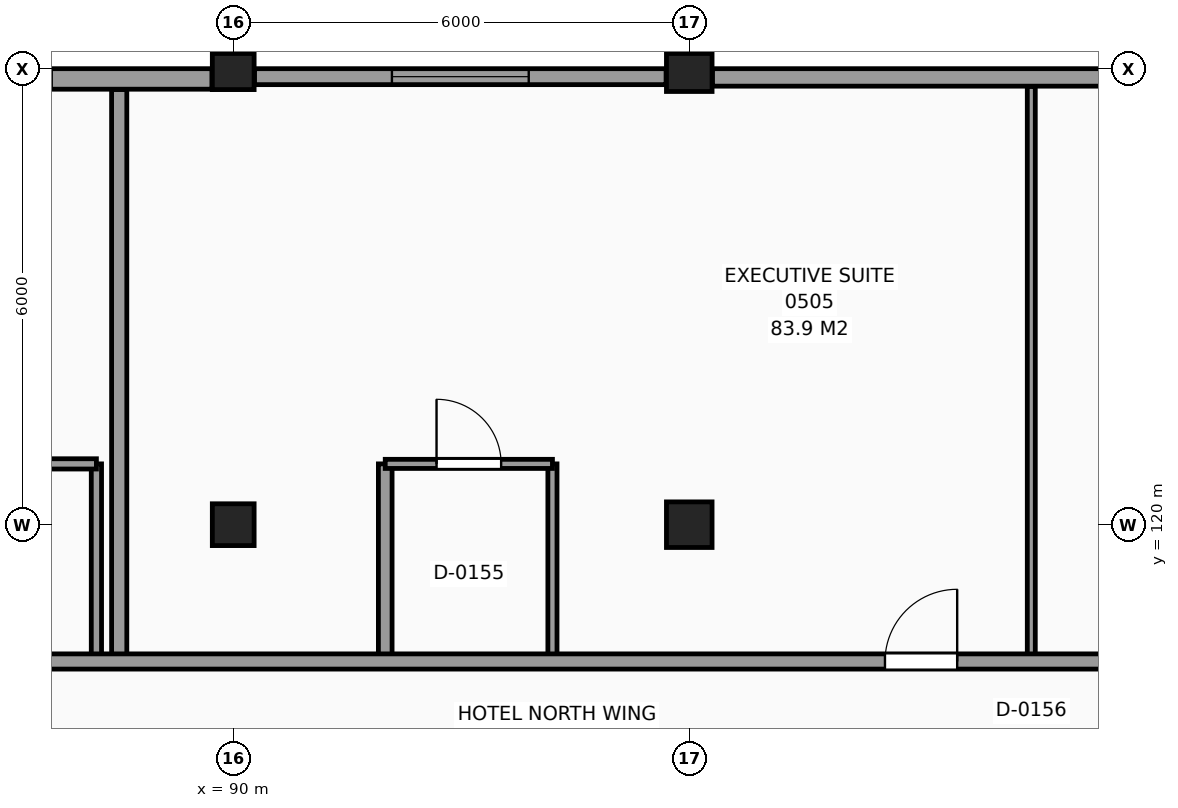
"""IFC4 building model, lengths in metres.
Left out: names, types, materials, properties, quantities, classifications, styles, units other than length and angle.
Written with IfcOpenShell. Run it as: python <this file> out.ifc"""

import sys

from ifc_helpers import new_model, si_unit, direction, frame, frame_2d, origin, origin_2d, place, context, subcontext, project, spatial, rectangle, extrude, element, fill, save


model = new_model("IFC4")
c1 = context("Model", 3, precision=1e-05, world=origin(), true_north=direction((0.0, 1.0)))
c2 = subcontext(c1, "Body", "Model", "MODEL_VIEW")
j1 = project(units=[si_unit("LENGTHUNIT", "METRE"), si_unit("PLANEANGLEUNIT", "RADIAN")], contexts=[c1])
p1 = place(None, origin())
s1 = spatial("IfcSite", under=j1, at=p1, CompositionType="ELEMENT")
p2 = place(p1, origin())
s2 = spatial("IfcBuilding", under=s1, at=p2, CompositionType="ELEMENT")
p3 = place(p2, frame((0.0, 0.0, 24.6)))
s3 = spatial("IfcBuildingStorey", under=s2, at=p3, CompositionType="ELEMENT", Elevation=24.6)
for number, where, z_axis, x_axis in (
    (1, (90.0, 120.0, 0.0), (0.0, 0.0, 1.0), (1.0, 0.0, 0.0)),
    (2, (90.0, 126.0, 0.0), (0.0, 0.0, 1.0), (1.0, 0.0, 0.0)),
):
    element("IfcColumn", number, at=place(p3, frame(where, z_axis=z_axis, x_axis=x_axis)), inside=s3, PredefinedType="COLUMN", context=c2, shape_type="SweptSolid", body=[
        extrude(rectangle(XDim=0.55, YDim=0.55, at=origin_2d()), origin(), (0.0, 0.0, 1.0), 3.6),
    ])
for number, where, z_axis, x_axis in (
    (3, (96.0, 120.0, 0.0), (0.0, 0.0, 1.0), (1.0, 0.0, 0.0)),
    (4, (96.0, 126.0, 0.0), (0.0, 0.0, 1.0), (1.0, 0.0, 0.0)),
):
    element("IfcColumn", number, at=place(p3, frame(where, z_axis=z_axis, x_axis=x_axis)), inside=s3, PredefinedType="COLUMN", context=c2, shape_type="SweptSolid", body=[
        extrude(rectangle(XDim=0.6, YDim=0.6, at=origin_2d()), origin(), (0.0, 0.0, 1.0), 3.6),
    ])
p4 = place(p3, frame((101.72, 125.885, 0.0), z_axis=(0.0, 0.0, 1.0), x_axis=(-1.0, 0.0, 0.0)))
e5 = element("IfcWall", 5, at=p4, inside=s3, PredefinedType="SOLIDWALL", context=c2, shape_type="SweptSolid", body=[
    extrude(rectangle(XDim=5.415, YDim=0.23, at=frame_2d((2.708, 0.0))), origin(), (0.0, 0.0, 1.0), 2.73),
])
p5 = place(p3, frame((95.695, 125.895, 0.0), z_axis=(0.0, 0.0, 1.0), x_axis=(-1.0, 0.0, 0.0)))
e6 = element("IfcWall", 6, at=p5, inside=s3, PredefinedType="SOLIDWALL", context=c2, shape_type="SweptSolid", body=[
    extrude(rectangle(XDim=5.415, YDim=0.21, at=frame_2d((2.708, 0.0))), origin(), (0.0, 0.0, 1.0), 2.73),
])
p6 = place(p5, frame((1.807, 0.0, 0.8)))
e7 = element("IfcOpeningElement", 7, at=p6, cuts=e6, PredefinedType="OPENING", context=c2, shape_type="SweptSolid", body=[
    extrude(rectangle(XDim=1.8, YDim=1.7, at=frame_2d((0.9, 0.85))), frame((0.0, 0.115, 0.0), z_axis=(0.0, -1.0, 0.0), x_axis=(1.0, 0.0, 0.0)), (0.0, 0.0, 1.0), 0.23),
])
p7 = place(p3, frame((89.72, 125.865, 0.0), z_axis=(0.0, 0.0, 1.0), x_axis=(-1.0, 0.0, 0.0)))
e8 = element("IfcWall", 8, at=p7, inside=s3, PredefinedType="SOLIDWALL", context=c2, shape_type="SweptSolid", body=[
    extrude(rectangle(XDim=5.415, YDim=0.27, at=frame_2d((2.708, 0.0))), origin(), (0.0, 0.0, 1.0), 2.73),
])
p8 = place(p7, frame((2.108, 0.0, 0.8)))
e9 = element("IfcOpeningElement", 9, at=p8, cuts=e8, PredefinedType="OPENING", context=c2, shape_type="SweptSolid", body=[
    extrude(rectangle(XDim=2.4, YDim=1.75, at=frame_2d((1.2, 0.875))), frame((0.0, 0.145, 0.0), z_axis=(0.0, -1.0, 0.0), x_axis=(1.0, 0.0, 0.0)), (0.0, 0.0, 1.0), 0.29),
])
p9 = place(p3, frame((88.2, 118.2, 0.0), z_axis=(0.0, 0.0, 1.0), x_axis=(0.0, 1.0, 0.0)))
e10 = element("IfcWall", 10, at=p9, inside=s3, PredefinedType="PARTITIONING", context=c2, shape_type="SweptSolid", body=[
    extrude(rectangle(XDim=2.6, YDim=0.135, at=frame_2d((1.3, 0.0))), origin(), (0.0, 0.0, 1.0), 3.38),
])
p10 = place(p3, frame((88.5, 118.2, 0.0), z_axis=(0.0, 0.0, 1.0), x_axis=(0.0, 1.0, 0.0)))
e11 = element("IfcWall", 11, at=p10, inside=s3, PredefinedType="PARTITIONING", context=c2, shape_type="SweptSolid", body=[
    extrude(rectangle(XDim=7.525, YDim=0.2, at=frame_2d((3.763, 0.0))), origin(), (0.0, 0.0, 1.0), 3.38),
])
p11 = place(p3, frame((92.0, 118.2, 0.0), z_axis=(0.0, 0.0, 1.0), x_axis=(0.0, 1.0, 0.0)))
e12 = element("IfcWall", 12, at=p11, inside=s3, PredefinedType="PARTITIONING", context=c2, shape_type="SweptSolid", body=[
    extrude(rectangle(XDim=2.6, YDim=0.18, at=frame_2d((1.3, 0.0))), origin(), (0.0, 0.0, 1.0), 3.38),
])
p12 = place(p3, frame((94.2, 118.2, 0.0), z_axis=(0.0, 0.0, 1.0), x_axis=(0.0, 1.0, 0.0)))
e13 = element("IfcWall", 13, at=p12, inside=s3, PredefinedType="PARTITIONING", context=c2, shape_type="SweptSolid", body=[
    extrude(rectangle(XDim=2.6, YDim=0.12, at=frame_2d((1.3, 0.0))), origin(), (0.0, 0.0, 1.0), 3.38),
])
p13 = place(p3, frame((100.5, 118.2, 0.0), z_axis=(0.0, 0.0, 1.0), x_axis=(0.0, 1.0, 0.0)))
e14 = element("IfcWall", 14, at=p13, inside=s3, PredefinedType="PARTITIONING", context=c2, shape_type="SweptSolid", body=[
    extrude(rectangle(XDim=7.565, YDim=0.105, at=frame_2d((3.782, 0.0))), origin(), (0.0, 0.0, 1.0), 3.38),
])
p14 = place(p3, frame((66.255, 118.2, 0.0), z_axis=(0.0, 0.0, 1.0), x_axis=(1.0, 0.0, 0.0)))
e15 = element("IfcWall", 15, at=p14, inside=s3, PredefinedType="PARTITIONING", context=c2, shape_type="SweptSolid", body=[
    extrude(rectangle(XDim=110.245, YDim=0.2, at=frame_2d((55.123, 0.0))), origin(), (0.0, 0.0, 1.0), 3.38),
])
p15 = place(p14, frame((7.57, 0.0, 0.0)))
e16 = element("IfcOpeningElement", 16, at=p15, cuts=e15, PredefinedType="OPENING", context=c2, shape_type="SweptSolid", body=[
    extrude(rectangle(XDim=0.95, YDim=2.1, at=frame_2d((0.475, 1.05))), frame((0.0, 0.11, 0.0), z_axis=(0.0, -1.0, 0.0), x_axis=(1.0, 0.0, 0.0)), (0.0, 0.0, 1.0), 0.22),
])
p16 = place(p14, frame((12.07, 0.0, 0.0)))
e17 = element("IfcOpeningElement", 17, at=p16, cuts=e15, PredefinedType="OPENING", context=c2, shape_type="SweptSolid", body=[
    extrude(rectangle(XDim=0.95, YDim=2.1, at=frame_2d((0.475, 1.05))), frame((0.0, 0.11, 0.0), z_axis=(0.0, -1.0, 0.0), x_axis=(1.0, 0.0, 0.0)), (0.0, 0.0, 1.0), 0.22),
])
p17 = place(p14, frame((16.27, 0.0, 0.0)))
e18 = element("IfcOpeningElement", 18, at=p17, cuts=e15, PredefinedType="OPENING", context=c2, shape_type="SweptSolid", body=[
    extrude(rectangle(XDim=0.95, YDim=2.1, at=frame_2d((0.475, 1.05))), frame((0.0, 0.11, 0.0), z_axis=(0.0, -1.0, 0.0), x_axis=(1.0, 0.0, 0.0)), (0.0, 0.0, 1.0), 0.22),
])
p18 = place(p14, frame((18.47, 0.0, 0.0)))
e19 = element("IfcOpeningElement", 19, at=p18, cuts=e15, PredefinedType="OPENING", context=c2, shape_type="SweptSolid", body=[
    extrude(rectangle(XDim=0.95, YDim=2.1, at=frame_2d((0.475, 1.05))), frame((0.0, 0.11, 0.0), z_axis=(0.0, -1.0, 0.0), x_axis=(1.0, 0.0, 0.0)), (0.0, 0.0, 1.0), 0.22),
])
p19 = place(p14, frame((32.32, 0.0, 0.0)))
e20 = element("IfcOpeningElement", 20, at=p19, cuts=e15, PredefinedType="OPENING", context=c2, shape_type="SweptSolid", body=[
    extrude(rectangle(XDim=0.95, YDim=2.1, at=frame_2d((0.475, 1.05))), frame((0.0, 0.11, 0.0), z_axis=(0.0, -1.0, 0.0), x_axis=(1.0, 0.0, 0.0)), (0.0, 0.0, 1.0), 0.22),
])
p20 = place(p14, frame((36.47, 0.0, 0.0)))
e21 = element("IfcOpeningElement", 21, at=p20, cuts=e15, PredefinedType="OPENING", context=c2, shape_type="SweptSolid", body=[
    extrude(rectangle(XDim=0.95, YDim=2.1, at=frame_2d((0.475, 1.05))), frame((0.0, 0.11, 0.0), z_axis=(0.0, -1.0, 0.0), x_axis=(1.0, 0.0, 0.0)), (0.0, 0.0, 1.0), 0.22),
])
p21 = place(p14, frame((46.27, 0.0, 0.0)))
e22 = element("IfcOpeningElement", 22, at=p21, cuts=e15, PredefinedType="OPENING", context=c2, shape_type="SweptSolid", body=[
    extrude(rectangle(XDim=0.95, YDim=2.1, at=frame_2d((0.475, 1.05))), frame((0.0, 0.11, 0.0), z_axis=(0.0, -1.0, 0.0), x_axis=(1.0, 0.0, 0.0)), (0.0, 0.0, 1.0), 0.22),
])
p22 = place(p14, frame((48.47, 0.0, 0.0)))
e23 = element("IfcOpeningElement", 23, at=p22, cuts=e15, PredefinedType="OPENING", context=c2, shape_type="SweptSolid", body=[
    extrude(rectangle(XDim=0.95, YDim=2.1, at=frame_2d((0.475, 1.05))), frame((0.0, 0.11, 0.0), z_axis=(0.0, -1.0, 0.0), x_axis=(1.0, 0.0, 0.0)), (0.0, 0.0, 1.0), 0.22),
])
p23 = place(p14, frame((52.87, 0.0, 0.0)))
e24 = element("IfcOpeningElement", 24, at=p23, cuts=e15, PredefinedType="OPENING", context=c2, shape_type="SweptSolid", body=[
    extrude(rectangle(XDim=0.95, YDim=2.1, at=frame_2d((0.475, 1.05))), frame((0.0, 0.11, 0.0), z_axis=(0.0, -1.0, 0.0), x_axis=(1.0, 0.0, 0.0)), (0.0, 0.0, 1.0), 0.22),
])
p24 = place(p14, frame((60.07, 0.0, 0.0)))
e25 = element("IfcOpeningElement", 25, at=p24, cuts=e15, PredefinedType="OPENING", context=c2, shape_type="SweptSolid", body=[
    extrude(rectangle(XDim=0.95, YDim=2.1, at=frame_2d((0.475, 1.05))), frame((0.0, 0.11, 0.0), z_axis=(0.0, -1.0, 0.0), x_axis=(1.0, 0.0, 0.0)), (0.0, 0.0, 1.0), 0.22),
])
p25 = place(p14, frame((68.32, 0.0, 0.0)))
e26 = element("IfcOpeningElement", 26, at=p25, cuts=e15, PredefinedType="OPENING", context=c2, shape_type="SweptSolid", body=[
    extrude(rectangle(XDim=0.95, YDim=2.1, at=frame_2d((0.475, 1.05))), frame((0.0, 0.11, 0.0), z_axis=(0.0, -1.0, 0.0), x_axis=(1.0, 0.0, 0.0)), (0.0, 0.0, 1.0), 0.22),
])
p26 = place(p14, frame((80.32, 0.0, 0.0)))
e27 = element("IfcOpeningElement", 27, at=p26, cuts=e15, PredefinedType="OPENING", context=c2, shape_type="SweptSolid", body=[
    extrude(rectangle(XDim=0.95, YDim=2.1, at=frame_2d((0.475, 1.05))), frame((0.0, 0.11, 0.0), z_axis=(0.0, -1.0, 0.0), x_axis=(1.0, 0.0, 0.0)), (0.0, 0.0, 1.0), 0.22),
])
p27 = place(p14, frame((82.87, 0.0, 0.0)))
e28 = element("IfcOpeningElement", 28, at=p27, cuts=e15, PredefinedType="OPENING", context=c2, shape_type="SweptSolid", body=[
    extrude(rectangle(XDim=0.95, YDim=2.1, at=frame_2d((0.475, 1.05))), frame((0.0, 0.11, 0.0), z_axis=(0.0, -1.0, 0.0), x_axis=(1.0, 0.0, 0.0)), (0.0, 0.0, 1.0), 0.22),
])
p28 = place(p14, frame((90.07, 0.0, 0.0)))
e29 = element("IfcOpeningElement", 29, at=p28, cuts=e15, PredefinedType="OPENING", context=c2, shape_type="SweptSolid", body=[
    extrude(rectangle(XDim=0.95, YDim=2.1, at=frame_2d((0.475, 1.05))), frame((0.0, 0.11, 0.0), z_axis=(0.0, -1.0, 0.0), x_axis=(1.0, 0.0, 0.0)), (0.0, 0.0, 1.0), 0.22),
])
p29 = place(p14, frame((94.27, 0.0, 0.0)))
e30 = element("IfcOpeningElement", 30, at=p29, cuts=e15, PredefinedType="OPENING", context=c2, shape_type="SweptSolid", body=[
    extrude(rectangle(XDim=0.95, YDim=2.1, at=frame_2d((0.475, 1.05))), frame((0.0, 0.11, 0.0), z_axis=(0.0, -1.0, 0.0), x_axis=(1.0, 0.0, 0.0)), (0.0, 0.0, 1.0), 0.22),
])
p30 = place(p14, frame((103.57, 0.0, 0.0)))
e31 = element("IfcOpeningElement", 31, at=p30, cuts=e15, PredefinedType="OPENING", context=c2, shape_type="SweptSolid", body=[
    extrude(rectangle(XDim=0.95, YDim=2.1, at=frame_2d((0.475, 1.05))), frame((0.0, 0.11, 0.0), z_axis=(0.0, -1.0, 0.0), x_axis=(1.0, 0.0, 0.0)), (0.0, 0.0, 1.0), 0.22),
])
p31 = place(p14, frame((104.97, 0.0, 0.0)))
e32 = element("IfcOpeningElement", 32, at=p31, cuts=e15, PredefinedType="OPENING", context=c2, shape_type="SweptSolid", body=[
    extrude(rectangle(XDim=0.95, YDim=2.1, at=frame_2d((0.475, 1.05))), frame((0.0, 0.11, 0.0), z_axis=(0.0, -1.0, 0.0), x_axis=(1.0, 0.0, 0.0)), (0.0, 0.0, 1.0), 0.22),
])
p32 = place(p3, frame((86.0, 120.8, 0.0), z_axis=(0.0, 0.0, 1.0), x_axis=(1.0, 0.0, 0.0)))
e33 = element("IfcWall", 33, at=p32, inside=s3, PredefinedType="PARTITIONING", context=c2, shape_type="SweptSolid", body=[
    extrude(rectangle(XDim=2.2, YDim=0.135, at=frame_2d((1.1, 0.0))), origin(), (0.0, 0.0, 1.0), 3.38),
])
p33 = place(p32, frame((0.675, 0.0, 0.0)))
e34 = element("IfcOpeningElement", 34, at=p33, cuts=e33, PredefinedType="OPENING", context=c2, shape_type="SweptSolid", body=[
    extrude(rectangle(XDim=0.85, YDim=2.1, at=frame_2d((0.425, 1.05))), frame((0.0, 0.078, 0.0), z_axis=(0.0, -1.0, 0.0), x_axis=(1.0, 0.0, 0.0)), (0.0, 0.0, 1.0), 0.155),
])
p34 = place(p3, frame((92.0, 120.8, 0.0), z_axis=(0.0, 0.0, 1.0), x_axis=(1.0, 0.0, 0.0)))
e35 = element("IfcWall", 35, at=p34, inside=s3, PredefinedType="PARTITIONING", context=c2, shape_type="SweptSolid", body=[
    extrude(rectangle(XDim=2.2, YDim=0.12, at=frame_2d((1.1, 0.0))), origin(), (0.0, 0.0, 1.0), 3.38),
])
p35 = place(p34, frame((0.675, 0.0, 0.0)))
e36 = element("IfcOpeningElement", 36, at=p35, cuts=e35, PredefinedType="OPENING", context=c2, shape_type="SweptSolid", body=[
    extrude(rectangle(XDim=0.85, YDim=2.1, at=frame_2d((0.425, 1.05))), frame((0.0, 0.07, 0.0), z_axis=(0.0, -1.0, 0.0), x_axis=(1.0, 0.0, 0.0)), (0.0, 0.0, 1.0), 0.14),
])
p36 = place(p6, origin())
e37 = element("IfcWindow", 37, at=p36, inside=s3, PartitioningType="SINGLE_PANEL", PredefinedType="WINDOW", context=c2, shape_type="SweptSolid", body=[
    extrude(rectangle(XDim=1.8, YDim=1.7, at=frame_2d((0.9, 0.85))), frame((0.0, 0.03, 0.0), z_axis=(0.0, -1.0, 0.0), x_axis=(1.0, 0.0, 0.0)), (0.0, 0.0, 1.0), 0.06),
])
fill(e7, e37)
p37 = place(p35, origin())
e38 = element("IfcDoor", 38, at=p37, inside=s3, OperationType="SINGLE_SWING_LEFT", PredefinedType="DOOR", context=c2, shape_type="SweptSolid", body=[
    extrude(rectangle(XDim=0.85, YDim=2.1, at=frame_2d((0.425, 1.05))), frame((0.0, 0.025, 0.0), z_axis=(0.0, -1.0, 0.0), x_axis=(1.0, 0.0, 0.0)), (0.0, 0.0, 1.0), 0.05),
])
fill(e36, e38)
p38 = place(p19, origin())
e39 = element("IfcDoor", 39, at=p38, inside=s3, OperationType="SINGLE_SWING_RIGHT", PredefinedType="DOOR", context=c2, shape_type="SweptSolid", body=[
    extrude(rectangle(XDim=0.95, YDim=2.1, at=frame_2d((0.475, 1.05))), frame((0.0, 0.025, 0.0), z_axis=(0.0, -1.0, 0.0), x_axis=(1.0, 0.0, 0.0)), (0.0, 0.0, 1.0), 0.05),
])
fill(e20, e39)
save(model, sys.argv[1])
